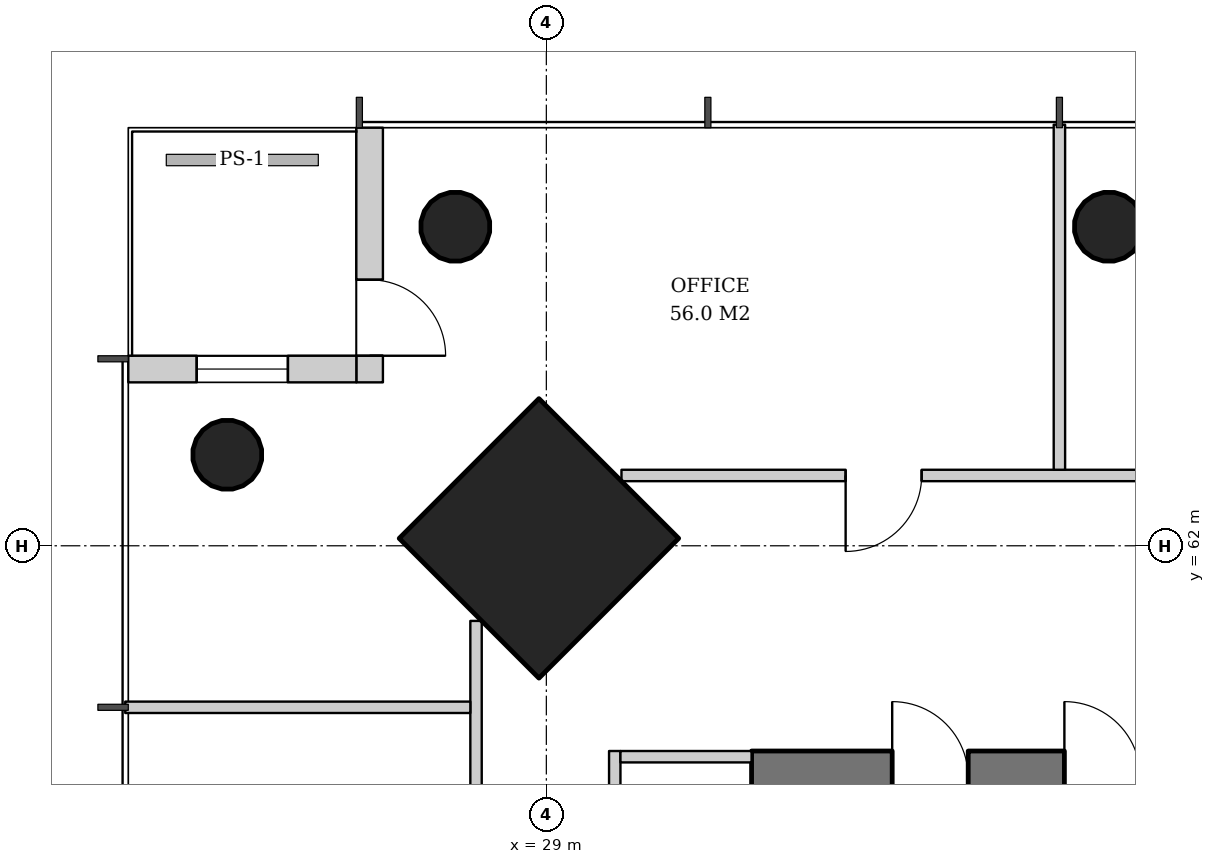
"""IFC4 building model, lengths in metres.
Left out: names, types, materials, properties, quantities, classifications, styles, units other than length and angle.
Written with IfcOpenShell. Run it as: python <this file> out.ifc"""

import sys

from ifc_helpers import new_model, si_unit, direction, frame, frame_2d, origin, origin_2d, place, context, subcontext, project, spatial, rectangle, hollow_circle, extrude, element, fill, save


model = new_model("IFC4")
c1 = context("Model", 3, precision=1e-05, world=origin(), true_north=direction((0.0, 1.0)))
c2 = subcontext(c1, "Body", "Model", "MODEL_VIEW")
j1 = project(units=[si_unit("LENGTHUNIT", "METRE"), si_unit("PLANEANGLEUNIT", "RADIAN")], contexts=[c1])
p1 = place(None, origin())
s1 = spatial("IfcSite", under=j1, at=p1, CompositionType="ELEMENT")
p2 = place(p1, origin())
s2 = spatial("IfcBuilding", under=s1, at=p2, CompositionType="ELEMENT")
p3 = place(p2, frame((0.0, 0.0, 138.8)))
s3 = spatial("IfcBuildingStorey", under=s2, at=p3, CompositionType="ELEMENT", Elevation=138.8)
p4 = place(p3, frame((28.864, 62.136, 0.0), z_axis=(0.031898107953, -0.031898107953, 0.998981992539), x_axis=(0.707106781187, 0.707106781187, 0.0)))
e1 = element("IfcColumn", 1, at=p4, inside=s3, PredefinedType="COLUMN", context=c2, shape_type="SweptSolid", body=[
    extrude(rectangle(XDim=2.6, YDim=2.6, at=origin_2d()), origin(), (0.0, 0.0, 1.0), 3.804),
])
p5 = place(p3, frame((27.764, 66.236, 0.0), z_axis=(0.031898107953, -0.031898107953, 0.998981992539), x_axis=(0.707106781187, 0.707106781187, 0.0)))
e2 = element("IfcColumn", 2, at=p5, inside=s3, PredefinedType="COLUMN", context=c2, shape_type="SweptSolid", body=[
    extrude(hollow_circle(Radius=0.457, WallThickness=0.03, at=origin_2d()), origin(), (0.0, 0.0, 1.0), 3.804),
])
p6 = place(p3, frame((36.382, 66.236, 0.0), z_axis=(0.015987237665, -0.031910269556, 0.999362868496), x_axis=(0.894067115991, 0.447933021895, 0.0)))
e3 = element("IfcColumn", 3, at=p6, inside=s3, PredefinedType="COLUMN", context=c2, shape_type="SweptSolid", body=[
    extrude(hollow_circle(Radius=0.457, WallThickness=0.03, at=origin_2d()), origin(), (0.0, 0.0, 1.0), 3.802),
])
p7 = place(p3, frame((24.764, 63.236, 0.0), z_axis=(0.031898107953, -0.031898107953, 0.998981992539), x_axis=(0.707106781187, 0.707106781187, 0.0)))
e4 = element("IfcColumn", 4, at=p7, inside=s3, PredefinedType="COLUMN", context=c2, shape_type="SweptSolid", body=[
    extrude(hollow_circle(Radius=0.457, WallThickness=0.03, at=origin_2d()), origin(), (0.0, 0.0, 1.0), 3.804),
])
p8 = place(p3, frame((31.7, 58.95, 0.0), z_axis=(0.0, 0.0, 1.0), x_axis=(1.0, 0.0, 0.0)))
e5 = element("IfcWall", 5, at=p8, inside=s3, PredefinedType="SHEAR", context=c2, shape_type="SweptSolid", body=[
    extrude(rectangle(XDim=26.6, YDim=0.7, at=frame_2d((13.3, 0.0))), origin(), (0.0, 0.0, 1.0), 3.8),
])
p9 = place(p8, frame((17.94, 0.0, 0.0)))
e6 = element("IfcOpeningElement", 6, at=p9, cuts=e5, PredefinedType="OPENING", context=c2, shape_type="SweptSolid", body=[
    extrude(rectangle(XDim=1.0, YDim=2.1, at=frame_2d((0.5, 1.05))), frame((0.0, 0.36, 0.0), z_axis=(0.0, -1.0, 0.0), x_axis=(1.0, 0.0, 0.0)), (0.0, 0.0, 1.0), 0.72),
])
p10 = place(p8, frame((5.825, 0.0, 0.0)))
e7 = element("IfcOpeningElement", 7, at=p10, cuts=e5, PredefinedType="OPENING", context=c2, shape_type="SweptSolid", body=[
    extrude(rectangle(XDim=1.0, YDim=2.1, at=frame_2d((0.5, 1.05))), frame((0.0, 0.36, 0.0), z_axis=(0.0, -1.0, 0.0), x_axis=(1.0, 0.0, 0.0)), (0.0, 0.0, 1.0), 0.72),
])
p11 = place(p8, frame((1.85, 0.0, 0.0)))
e8 = element("IfcOpeningElement", 8, at=p11, cuts=e5, PredefinedType="OPENING", context=c2, shape_type="SweptSolid", body=[
    extrude(rectangle(XDim=1.0, YDim=2.1, at=frame_2d((0.5, 1.05))), frame((0.0, 0.36, 0.0), z_axis=(0.0, -1.0, 0.0), x_axis=(1.0, 0.0, 0.0)), (0.0, 0.0, 1.0), 0.72),
])
p12 = place(p8, frame((4.115, 0.0, 0.0)))
e9 = element("IfcOpeningElement", 9, at=p12, cuts=e5, PredefinedType="OPENING", context=c2, shape_type="SweptSolid", body=[
    extrude(rectangle(XDim=1.0, YDim=2.1, at=frame_2d((0.5, 1.05))), frame((0.0, 0.36, 0.0), z_axis=(0.0, -1.0, 0.0), x_axis=(1.0, 0.0, 0.0)), (0.0, 0.0, 1.0), 0.72),
])
p13 = place(p8, frame((8.342, 0.0, 0.0)))
e10 = element("IfcOpeningElement", 10, at=p13, cuts=e5, PredefinedType="OPENING", context=c2, shape_type="SweptSolid", body=[
    extrude(rectangle(XDim=1.0, YDim=2.1, at=frame_2d((0.5, 1.05))), frame((0.0, 0.36, 0.0), z_axis=(0.0, -1.0, 0.0), x_axis=(1.0, 0.0, 0.0)), (0.0, 0.0, 1.0), 0.72),
])
p14 = place(p8, frame((11.626, 0.0, 0.0)))
e11 = element("IfcOpeningElement", 11, at=p14, cuts=e5, PredefinedType="OPENING", context=c2, shape_type="SweptSolid", body=[
    extrude(rectangle(XDim=1.0, YDim=2.1, at=frame_2d((0.5, 1.05))), frame((0.0, 0.36, 0.0), z_axis=(0.0, -1.0, 0.0), x_axis=(1.0, 0.0, 0.0)), (0.0, 0.0, 1.0), 0.72),
])
p15 = place(p8, frame((14.862, 0.0, 0.0)))
e12 = element("IfcOpeningElement", 12, at=p15, cuts=e5, PredefinedType="OPENING", context=c2, shape_type="SweptSolid", body=[
    extrude(rectangle(XDim=1.0, YDim=2.1, at=frame_2d((0.5, 1.05))), frame((0.0, 0.36, 0.0), z_axis=(0.0, -1.0, 0.0), x_axis=(1.0, 0.0, 0.0)), (0.0, 0.0, 1.0), 0.72),
])
p16 = place(p8, frame((20.9, 0.0, 0.0)))
e13 = element("IfcOpeningElement", 13, at=p16, cuts=e5, PredefinedType="OPENING", context=c2, shape_type="SweptSolid", body=[
    extrude(rectangle(XDim=1.0, YDim=2.1, at=frame_2d((0.5, 1.05))), frame((0.0, 0.36, 0.0), z_axis=(0.0, -1.0, 0.0), x_axis=(1.0, 0.0, 0.0)), (0.0, 0.0, 1.0), 0.72),
])
p17 = place(p8, frame((23.75, 0.0, 0.0)))
e14 = element("IfcOpeningElement", 14, at=p17, cuts=e5, PredefinedType="OPENING", context=c2, shape_type="SweptSolid", body=[
    extrude(rectangle(XDim=1.0, YDim=2.1, at=frame_2d((0.5, 1.05))), frame((0.0, 0.36, 0.0), z_axis=(0.0, -1.0, 0.0), x_axis=(1.0, 0.0, 0.0)), (0.0, 0.0, 1.0), 0.72),
])
p18 = place(p3, frame((26.675, 67.5, 0.0), z_axis=(0.0, 0.0, 1.0), x_axis=(0.0, -1.0, 0.0)))
e15 = element("IfcWall", 15, at=p18, inside=s3, PredefinedType="SOLIDWALL", context=c2, shape_type="SweptSolid", body=[
    extrude(rectangle(XDim=3.35, YDim=0.35, at=frame_2d((1.675, 0.0))), origin(), (0.0, 0.0, 1.0), 3.62),
])
p19 = place(p18, frame((2.0, 0.0, 0.0)))
e16 = element("IfcOpeningElement", 16, at=p19, cuts=e15, PredefinedType="OPENING", context=c2, shape_type="SweptSolid", body=[
    extrude(rectangle(XDim=1.0, YDim=2.4, at=frame_2d((0.5, 1.2))), frame((0.0, 0.185, 0.0), z_axis=(0.0, -1.0, 0.0), x_axis=(1.0, 0.0, 0.0)), (0.0, 0.0, 1.0), 0.37),
])
p20 = place(p3, frame((26.5, 64.325, 0.0), z_axis=(0.0, 0.0, 1.0), x_axis=(-1.0, 0.0, 0.0)))
e17 = element("IfcWall", 17, at=p20, inside=s3, PredefinedType="SOLIDWALL", context=c2, shape_type="SweptSolid", body=[
    extrude(rectangle(XDim=3.0, YDim=0.35, at=frame_2d((1.5, 0.0))), origin(), (0.0, 0.0, 1.0), 3.62),
])
p21 = place(p20, frame((0.9, 0.0, 0.6)))
e18 = element("IfcOpeningElement", 18, at=p21, cuts=e17, PredefinedType="OPENING", context=c2, shape_type="SweptSolid", body=[
    extrude(rectangle(XDim=1.2, YDim=2.55, at=frame_2d((0.6, 1.275))), frame((0.0, 0.185, 0.0), z_axis=(0.0, -1.0, 0.0), x_axis=(1.0, 0.0, 0.0)), (0.0, 0.0, 1.0), 0.37),
])
p22 = place(p3, frame((29.9, 59.3, 0.0), z_axis=(0.0, 0.0, 1.0), x_axis=(0.0, -1.0, 0.0)))
e19 = element("IfcWall", 19, at=p22, inside=s3, PredefinedType="PARTITIONING", context=c2, shape_type="SweptSolid", body=[
    extrude(rectangle(XDim=5.925, YDim=0.15, at=frame_2d((2.962, 0.0))), origin(), (0.0, 0.0, 1.0), 2.72),
])
p23 = place(p22, frame((2.462, 0.0, 0.0)))
e20 = element("IfcOpeningElement", 20, at=p23, cuts=e19, PredefinedType="OPENING", context=c2, shape_type="SweptSolid", body=[
    extrude(rectangle(XDim=1.0, YDim=2.1, at=frame_2d((0.5, 1.05))), frame((0.0, 0.085, 0.0), z_axis=(0.0, -1.0, 0.0), x_axis=(1.0, 0.0, 0.0)), (0.0, 0.0, 1.0), 0.17),
])
p24 = place(p3, frame((31.7, 59.225, 0.0), z_axis=(0.0, 0.0, 1.0), x_axis=(-1.0, 0.0, 0.0)))
e21 = element("IfcWall", 21, at=p24, inside=s3, PredefinedType="PARTITIONING", context=c2, shape_type="SweptSolid", body=[
    extrude(rectangle(XDim=1.725, YDim=0.15, at=frame_2d((0.862, 0.0))), origin(), (0.0, 0.0, 1.0), 3.62),
])
p25 = place(p3, frame((60.011, 62.925, 0.0), z_axis=(0.0, 0.0, 1.0), x_axis=(-1.0, 0.0, 0.0)))
e22 = element("IfcWall", 22, at=p25, inside=s3, PredefinedType="PARTITIONING", context=c2, shape_type="SweptSolid", body=[
    extrude(rectangle(XDim=30.023, YDim=0.15, at=frame_2d((15.011, 0.0))), origin(), (0.0, 0.0, 1.0), 2.72),
])
p26 = place(p25, frame((2.949, 0.0, 0.0)))
e23 = element("IfcOpeningElement", 23, at=p26, cuts=e22, PredefinedType="OPENING", context=c2, shape_type="SweptSolid", body=[
    extrude(rectangle(XDim=1.0, YDim=2.1, at=frame_2d((0.5, 1.05))), frame((0.0, 0.085, 0.0), z_axis=(0.0, -1.0, 0.0), x_axis=(1.0, 0.0, 0.0)), (0.0, 0.0, 1.0), 0.17),
])
p27 = place(p25, frame((7.574, 0.0, 0.0)))
e24 = element("IfcOpeningElement", 24, at=p27, cuts=e22, PredefinedType="OPENING", context=c2, shape_type="SweptSolid", body=[
    extrude(rectangle(XDim=1.0, YDim=2.1, at=frame_2d((0.5, 1.05))), frame((0.0, 0.085, 0.0), z_axis=(0.0, -1.0, 0.0), x_axis=(1.0, 0.0, 0.0)), (0.0, 0.0, 1.0), 0.17),
])
p28 = place(p25, frame((12.199, 0.0, 0.0)))
e25 = element("IfcOpeningElement", 25, at=p28, cuts=e22, PredefinedType="OPENING", context=c2, shape_type="SweptSolid", body=[
    extrude(rectangle(XDim=1.0, YDim=2.1, at=frame_2d((0.5, 1.05))), frame((0.0, 0.085, 0.0), z_axis=(0.0, -1.0, 0.0), x_axis=(1.0, 0.0, 0.0)), (0.0, 0.0, 1.0), 0.17),
])
p29 = place(p25, frame((16.824, 0.0, 0.0)))
e26 = element("IfcOpeningElement", 26, at=p29, cuts=e22, PredefinedType="OPENING", context=c2, shape_type="SweptSolid", body=[
    extrude(rectangle(XDim=1.0, YDim=2.1, at=frame_2d((0.5, 1.05))), frame((0.0, 0.085, 0.0), z_axis=(0.0, -1.0, 0.0), x_axis=(1.0, 0.0, 0.0)), (0.0, 0.0, 1.0), 0.17),
])
p30 = place(p25, frame((26.074, 0.0, 0.0)))
e27 = element("IfcOpeningElement", 27, at=p30, cuts=e22, PredefinedType="OPENING", context=c2, shape_type="SweptSolid", body=[
    extrude(rectangle(XDim=1.0, YDim=2.1, at=frame_2d((0.5, 1.05))), frame((0.0, 0.085, 0.0), z_axis=(0.0, -1.0, 0.0), x_axis=(1.0, 0.0, 0.0)), (0.0, 0.0, 1.0), 0.17),
])
p31 = place(p3, frame((35.75, 63.0, 0.0), z_axis=(0.0, 0.0, 1.0), x_axis=(0.0, 1.0, 0.0)))
e28 = element("IfcWall", 28, at=p31, inside=s3, PredefinedType="PARTITIONING", context=c2, shape_type="SweptSolid", body=[
    extrude(rectangle(XDim=4.54, YDim=0.15, at=frame_2d((2.27, 0.0))), origin(), (0.0, 0.0, 1.0), 2.82),
])
p32 = place(p3, frame((28.075, 61.011, 0.0), z_axis=(0.0, 0.0, 1.0), x_axis=(0.0, -1.0, 0.0)))
e29 = element("IfcWall", 29, at=p32, inside=s3, PredefinedType="PARTITIONING", context=c2, shape_type="SweptSolid", body=[
    extrude(rectangle(XDim=30.023, YDim=0.15, at=frame_2d((15.011, 0.0))), origin(), (0.0, 0.0, 1.0), 2.72),
])
p33 = place(p32, frame((2.949, 0.0, 0.0)))
e30 = element("IfcOpeningElement", 30, at=p33, cuts=e29, PredefinedType="OPENING", context=c2, shape_type="SweptSolid", body=[
    extrude(rectangle(XDim=1.0, YDim=2.1, at=frame_2d((0.5, 1.05))), frame((0.0, 0.085, 0.0), z_axis=(0.0, -1.0, 0.0), x_axis=(1.0, 0.0, 0.0)), (0.0, 0.0, 1.0), 0.17),
])
p34 = place(p32, frame((7.574, 0.0, 0.0)))
e31 = element("IfcOpeningElement", 31, at=p34, cuts=e29, PredefinedType="OPENING", context=c2, shape_type="SweptSolid", body=[
    extrude(rectangle(XDim=1.0, YDim=2.1, at=frame_2d((0.5, 1.05))), frame((0.0, 0.085, 0.0), z_axis=(0.0, -1.0, 0.0), x_axis=(1.0, 0.0, 0.0)), (0.0, 0.0, 1.0), 0.17),
])
p35 = place(p32, frame((12.199, 0.0, 0.0)))
e32 = element("IfcOpeningElement", 32, at=p35, cuts=e29, PredefinedType="OPENING", context=c2, shape_type="SweptSolid", body=[
    extrude(rectangle(XDim=1.0, YDim=2.1, at=frame_2d((0.5, 1.05))), frame((0.0, 0.085, 0.0), z_axis=(0.0, -1.0, 0.0), x_axis=(1.0, 0.0, 0.0)), (0.0, 0.0, 1.0), 0.17),
])
p36 = place(p32, frame((16.924, 0.0, 0.0)))
e33 = element("IfcOpeningElement", 33, at=p36, cuts=e29, PredefinedType="OPENING", context=c2, shape_type="SweptSolid", body=[
    extrude(rectangle(XDim=0.8, YDim=2.1, at=frame_2d((0.4, 1.05))), frame((0.0, 0.085, 0.0), z_axis=(0.0, -1.0, 0.0), x_axis=(1.0, 0.0, 0.0)), (0.0, 0.0, 1.0), 0.17),
])
p37 = place(p32, frame((21.449, 0.0, 0.0)))
e34 = element("IfcOpeningElement", 34, at=p37, cuts=e29, PredefinedType="OPENING", context=c2, shape_type="SweptSolid", body=[
    extrude(rectangle(XDim=1.0, YDim=2.1, at=frame_2d((0.5, 1.05))), frame((0.0, 0.085, 0.0), z_axis=(0.0, -1.0, 0.0), x_axis=(1.0, 0.0, 0.0)), (0.0, 0.0, 1.0), 0.17),
])
p38 = place(p32, frame((26.174, 0.0, 0.0)))
e35 = element("IfcOpeningElement", 35, at=p38, cuts=e29, PredefinedType="OPENING", context=c2, shape_type="SweptSolid", body=[
    extrude(rectangle(XDim=0.8, YDim=2.1, at=frame_2d((0.4, 1.05))), frame((0.0, 0.085, 0.0), z_axis=(0.0, -1.0, 0.0), x_axis=(1.0, 0.0, 0.0)), (0.0, 0.0, 1.0), 0.17),
])
p39 = place(p3, frame((28.0, 59.875, 0.0), z_axis=(0.0, 0.0, 1.0), x_axis=(-1.0, 0.0, 0.0)))
e36 = element("IfcWall", 36, at=p39, inside=s3, PredefinedType="PARTITIONING", context=c2, shape_type="SweptSolid", body=[
    extrude(rectangle(XDim=4.54, YDim=0.15, at=frame_2d((2.27, 0.0))), origin(), (0.0, 0.0, 1.0), 2.82),
])
p40 = place(p19, origin())
e37 = element("IfcDoor", 37, at=p40, inside=s3, OperationType="SINGLE_SWING_RIGHT", PredefinedType="DOOR", context=c2, shape_type="SweptSolid", body=[
    extrude(rectangle(XDim=1.0, YDim=2.4, at=frame_2d((0.5, 1.2))), frame((0.0, 0.025, 0.0), z_axis=(0.0, -1.0, 0.0), x_axis=(1.0, 0.0, 0.0)), (0.0, 0.0, 1.0), 0.05),
])
fill(e16, e37)
p41 = place(p21, origin())
e38 = element("IfcWindow", 38, at=p41, inside=s3, PartitioningType="SINGLE_PANEL", PredefinedType="WINDOW", context=c2, shape_type="SweptSolid", body=[
    extrude(rectangle(XDim=1.2, YDim=2.55, at=frame_2d((0.6, 1.275))), frame((0.0, 0.03, 0.0), z_axis=(0.0, -1.0, 0.0), x_axis=(1.0, 0.0, 0.0)), (0.0, 0.0, 1.0), 0.06),
])
fill(e18, e38)
p42 = place(p30, origin())
e39 = element("IfcDoor", 39, at=p42, inside=s3, OperationType="SINGLE_SWING_RIGHT", PredefinedType="DOOR", context=c2, shape_type="SweptSolid", body=[
    extrude(rectangle(XDim=1.0, YDim=2.1, at=frame_2d((0.5, 1.05))), frame((0.0, 0.025, 0.0), z_axis=(0.0, -1.0, 0.0), x_axis=(1.0, 0.0, 0.0)), (0.0, 0.0, 1.0), 0.05),
])
fill(e27, e39)
save(model, sys.argv[1])
